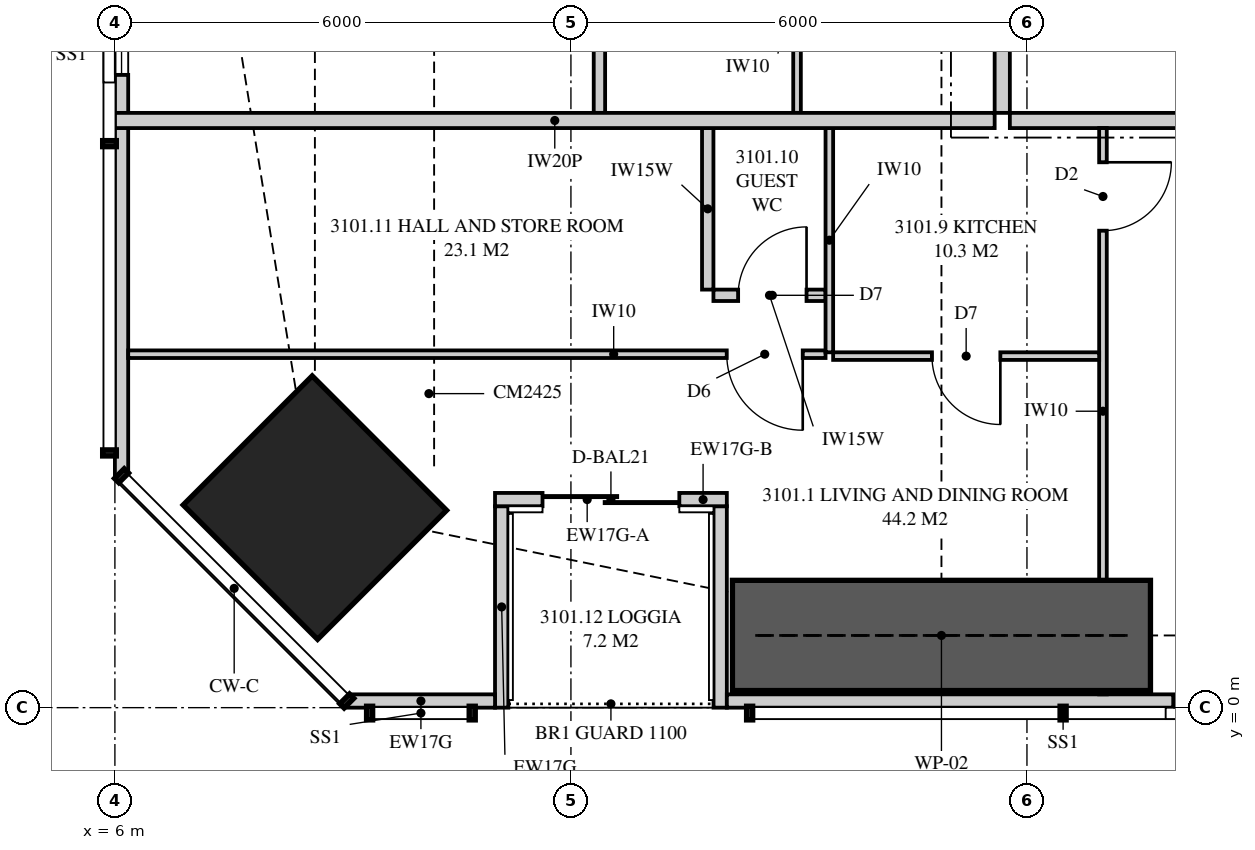
"""IFC4 building model, lengths in metres.
Left out: names, types, materials, properties, quantities, classifications, styles, units other than length and angle.
Written with IfcOpenShell. Run it as: python <this file> out.ifc"""

import sys

from ifc_helpers import new_model, si_unit, direction, frame, frame_2d, origin, origin_2d, place, context, subcontext, project, spatial, polyline, rectangle, outline, extrude, element, fill, save


model = new_model("IFC4")
c1 = context("Model", 3, precision=1e-05, world=origin(), true_north=direction((0.0, 1.0)))
c2 = subcontext(c1, "Body", "Model", "MODEL_VIEW")
j1 = project(units=[si_unit("LENGTHUNIT", "METRE"), si_unit("PLANEANGLEUNIT", "RADIAN")], contexts=[c1])
p1 = place(None, origin())
s1 = spatial("IfcSite", under=j1, at=p1, CompositionType="ELEMENT")
p2 = place(p1, origin())
s2 = spatial("IfcBuilding", under=s1, at=p2, CompositionType="ELEMENT")
p3 = place(p2, frame((0.0, 0.0, 114.9)))
s3 = spatial("IfcBuildingStorey", under=s2, at=p3, CompositionType="ELEMENT", Elevation=114.9)
p4 = place(p3, frame((8.631, 2.631, 0.0), z_axis=(0.0, 0.0, 1.0), x_axis=(0.707106781187, 0.707106781187, 0.0)))
e1 = element("IfcColumn", 1, at=p4, inside=s3, PredefinedType="COLUMN", context=c2, shape_type="SweptSolid", body=[
    extrude(rectangle(XDim=2.4, YDim=2.5, at=origin_2d()), origin(), (0.0, 0.0, 1.0), 3.35),
])
p5 = place(p3, frame((9.051, 0.087, 0.0), z_axis=(0.0, 0.0, 1.0), x_axis=(1.0, 0.0, 0.0)))
e2 = element("IfcWall", 2, at=p5, inside=s3, PredefinedType="SOLIDWALL", context=c2, shape_type="SweptSolid", body=[
    extrude(rectangle(XDim=1.95, YDim=0.175, at=frame_2d((0.975, 0.0))), origin(), (0.0, 0.0, 1.0), 3.11),
])
p6 = place(p3, frame((14.051, 0.087, 0.0), z_axis=(0.0, 0.0, 1.0), x_axis=(1.0, 0.0, 0.0)))
e3 = element("IfcWall", 3, at=p6, inside=s3, PredefinedType="SOLIDWALL", context=c2, shape_type="SweptSolid", body=[
    extrude(outline(polyline([(0.0, 0.0), (27.374, 0.0), (27.374, 3.11), (24.777, 3.11), (24.777, 2.15), (24.732, 2.15), (24.732, 3.11), (24.574, 3.11), (24.574, 2.15), (2.824, 2.15), (2.824, 3.11), (2.666, 3.11), (2.666, 2.15), (2.62, 2.15), (2.62, 3.11), (0.0, 3.11), (0.0, 0.0)])), frame((0.0, 0.087, 0.0), z_axis=(0.0, -1.0, 0.0), x_axis=(1.0, 0.0, 0.0)), (0.0, 0.0, 1.0), 0.175),
])
p7 = place(p6, frame((5.874, 0.0, 0.4)))
e4 = element("IfcOpeningElement", 4, at=p7, cuts=e3, PredefinedType="OPENING", context=c2, shape_type="SweptSolid", body=[
    extrude(rectangle(XDim=1.8, YDim=1.7, at=frame_2d((0.9, 0.85))), frame((0.0, 0.097, 0.0), z_axis=(0.0, -1.0, 0.0), x_axis=(1.0, 0.0, 0.0)), (0.0, 0.0, 1.0), 0.195),
])
p8 = place(p6, frame((9.04, 0.0, 0.4)))
e5 = element("IfcOpeningElement", 5, at=p8, cuts=e3, PredefinedType="OPENING", context=c2, shape_type="SweptSolid", body=[
    extrude(rectangle(XDim=1.8, YDim=1.7, at=frame_2d((0.9, 0.85))), frame((0.0, 0.097, 0.0), z_axis=(0.0, -1.0, 0.0), x_axis=(1.0, 0.0, 0.0)), (0.0, 0.0, 1.0), 0.195),
])
p9 = place(p6, frame((16.564, 0.0, 0.4)))
e6 = element("IfcOpeningElement", 6, at=p9, cuts=e3, PredefinedType="OPENING", context=c2, shape_type="SweptSolid", body=[
    extrude(rectangle(XDim=1.8, YDim=1.7, at=frame_2d((0.9, 0.85))), frame((0.0, 0.097, 0.0), z_axis=(0.0, -1.0, 0.0), x_axis=(1.0, 0.0, 0.0)), (0.0, 0.0, 1.0), 0.195),
])
p10 = place(p6, frame((19.889, 0.0, 0.4)))
e7 = element("IfcOpeningElement", 7, at=p10, cuts=e3, PredefinedType="OPENING", context=c2, shape_type="SweptSolid", body=[
    extrude(rectangle(XDim=1.8, YDim=1.7, at=frame_2d((0.9, 0.85))), frame((0.0, 0.097, 0.0), z_axis=(0.0, -1.0, 0.0), x_axis=(1.0, 0.0, 0.0)), (0.0, 0.0, 1.0), 0.195),
])
p11 = place(p3, frame((11.001, 2.738, 0.0), z_axis=(0.0, 0.0, 1.0), x_axis=(1.0, 0.0, 0.0)))
e8 = element("IfcWall", 8, at=p11, inside=s3, PredefinedType="SOLIDWALL", context=c2, shape_type="SweptSolid", body=[
    extrude(rectangle(XDim=2.425, YDim=0.175, at=frame_2d((1.212, 0.0))), origin(), (0.0, 0.0, 1.0), 2.15),
])
p12 = place(p11, frame((0.625, 0.0, 0.0)))
e9 = element("IfcOpeningElement", 9, at=p12, cuts=e8, PredefinedType="OPENING", context=c2, shape_type="SweptSolid", body=[
    extrude(rectangle(XDim=1.8, YDim=2.1, at=frame_2d((0.9, 1.05))), frame((0.0, 0.097, 0.0), z_axis=(0.0, -1.0, 0.0), x_axis=(1.0, 0.0, 0.0)), (0.0, 0.0, 1.0), 0.195),
])
p13 = place(p3, frame((13.426, 2.738, 0.0), z_axis=(0.0, 0.0, 1.0), x_axis=(1.0, 0.0, 0.0)))
e10 = element("IfcWall", 10, at=p13, inside=s3, PredefinedType="SOLIDWALL", context=c2, shape_type="SweptSolid", body=[
    extrude(rectangle(XDim=0.625, YDim=0.175, at=frame_2d((0.312, 0.0))), origin(), (0.0, 0.0, 1.0), 3.11),
])
p14 = place(p3, frame((11.089, 0.0, 0.0), z_axis=(0.0, 0.0, 1.0), x_axis=(0.0, 1.0, 0.0)))
e11 = element("IfcWall", 11, at=p14, inside=s3, PredefinedType="SOLIDWALL", context=c2, shape_type="SweptSolid", body=[
    extrude(outline(polyline([(0.0, 0.0), (2.65, 0.0), (2.65, 2.15), (1.296, 2.15), (1.296, 3.11), (0.0, 3.11), (0.0, 0.0)])), frame((0.0, 0.087, 0.0), z_axis=(0.0, -1.0, 0.0), x_axis=(1.0, 0.0, 0.0)), (0.0, 0.0, 1.0), 0.175),
])
p15 = place(p3, frame((13.964, 0.0, 0.0), z_axis=(0.0, 0.0, 1.0), x_axis=(0.0, 1.0, 0.0)))
e12 = element("IfcWall", 12, at=p15, inside=s3, PredefinedType="SOLIDWALL", context=c2, shape_type="SweptSolid", body=[
    extrude(outline(polyline([(0.0, 0.0), (2.65, 0.0), (2.65, 3.11), (2.378, 3.11), (2.378, 2.15), (0.709, 2.15), (0.709, 3.11), (0.0, 3.11), (0.0, 0.0)])), frame((0.0, 0.087, 0.0), z_axis=(0.0, -1.0, 0.0), x_axis=(1.0, 0.0, 0.0)), (0.0, 0.0, 1.0), 0.175),
])
p16 = place(p3, frame((6.087, 17.358, 0.0), z_axis=(0.0, 0.0, 1.0), x_axis=(0.0, -1.0, 0.0)))
e13 = element("IfcWall", 13, at=p16, inside=s3, PredefinedType="SOLIDWALL", context=c2, shape_type="SweptSolid", body=[
    extrude(outline(polyline([(0.0, 0.0), (14.307, 0.0), (14.307, 3.11), (4.577, 3.11), (4.577, 2.15), (4.484, 2.15), (4.484, 3.11), (4.358, 3.11), (4.358, 2.15), (0.0, 2.15), (0.0, 0.0)])), frame((0.0, 0.087, 0.0), z_axis=(0.0, -1.0, 0.0), x_axis=(1.0, 0.0, 0.0)), (0.0, 0.0, 1.0), 0.175),
])
p17 = place(p16, frame((0.3, 0.0, 0.4)))
e14 = element("IfcOpeningElement", 14, at=p17, cuts=e13, PredefinedType="OPENING", context=c2, shape_type="SweptSolid", body=[
    extrude(rectangle(XDim=1.2, YDim=1.7, at=frame_2d((0.6, 0.85))), frame((0.0, 0.097, 0.0), z_axis=(0.0, -1.0, 0.0), x_axis=(1.0, 0.0, 0.0)), (0.0, 0.0, 1.0), 0.195),
])
p18 = place(p16, frame((7.233, 0.0, 0.4)))
e15 = element("IfcOpeningElement", 15, at=p18, cuts=e13, PredefinedType="OPENING", context=c2, shape_type="SweptSolid", body=[
    extrude(rectangle(XDim=1.8, YDim=1.7, at=frame_2d((0.9, 0.85))), frame((0.0, 0.097, 0.0), z_axis=(0.0, -1.0, 0.0), x_axis=(1.0, 0.0, 0.0)), (0.0, 0.0, 1.0), 0.195),
])
p19 = place(p3, frame((17.775, 7.725, 0.0), z_axis=(0.0, 0.0, 1.0), x_axis=(1.0, 0.0, 0.0)))
e16 = element("IfcWall", 16, at=p19, inside=s3, PredefinedType="PARTITIONING", context=c2, shape_type="SweptSolid", body=[
    extrude(outline(polyline([(0.0, 0.0), (19.225, 0.0), (19.225, 3.11), (10.312, 3.11), (10.312, 2.541), (9.638, 2.541), (9.638, 3.11), (0.0, 3.11), (0.0, 0.0)])), frame((0.0, 0.1, 0.0), z_axis=(0.0, -1.0, 0.0), x_axis=(1.0, 0.0, 0.0)), (0.0, 0.0, 1.0), 0.2),
])
p20 = place(p19, frame((3.275, 0.0, 0.0)))
e17 = element("IfcOpeningElement", 17, at=p20, cuts=e16, PredefinedType="OPENING", context=c2, shape_type="SweptSolid", body=[
    extrude(rectangle(XDim=1.05, YDim=2.2, at=frame_2d((0.525, 1.1))), frame((0.0, 0.11, 0.0), z_axis=(0.0, -1.0, 0.0), x_axis=(1.0, 0.0, 0.0)), (0.0, 0.0, 1.0), 0.22),
])
p21 = place(p3, frame((19.0, 0.175, 0.0), z_axis=(0.0, 0.0, 1.0), x_axis=(0.0, 1.0, 0.0)))
e18 = element("IfcWall", 18, at=p21, inside=s3, PredefinedType="PARTITIONING", context=c2, shape_type="SweptSolid", body=[
    extrude(outline(polyline([(0.529, 2.15), (0.0, 2.15), (0.0, 0.0), (0.529, 0.0), (0.529, 0.017), (1.021, 0.017), (1.021, 0.0), (7.45, 0.0), (7.45, 3.11), (1.635, 3.11), (1.635, 2.15), (1.021, 2.15), (1.021, 2.133), (0.529, 2.133), (0.529, 2.15)])), frame((0.0, 0.05, 0.0), z_axis=(0.0, -1.0, 0.0), x_axis=(1.0, 0.0, 0.0)), (0.0, 0.0, 1.0), 0.1),
])
p22 = place(p21, frame((6.1, 0.0, 0.0)))
e19 = element("IfcOpeningElement", 19, at=p22, cuts=e18, PredefinedType="OPENING", context=c2, shape_type="SweptSolid", body=[
    extrude(rectangle(XDim=0.9, YDim=2.1, at=frame_2d((0.45, 1.05))), frame((0.0, 0.06, 0.0), z_axis=(0.0, -1.0, 0.0), x_axis=(1.0, 0.0, 0.0)), (0.0, 0.0, 1.0), 0.12),
])
p23 = place(p3, frame((15.45, 4.625, 0.0), z_axis=(0.0, 0.0, 1.0), x_axis=(1.0, 0.0, 0.0)))
e20 = element("IfcWall", 20, at=p23, inside=s3, PredefinedType="PARTITIONING", context=c2, shape_type="SweptSolid", body=[
    extrude(outline(polyline([(0.0, 0.0), (3.5, 0.0), (3.5, 3.11), (1.712, 3.11), (1.712, 2.541), (1.138, 2.541), (1.138, 3.11), (0.0, 3.11), (0.0, 0.0)])), frame((0.0, 0.05, 0.0), z_axis=(0.0, -1.0, 0.0), x_axis=(1.0, 0.0, 0.0)), (0.0, 0.0, 1.0), 0.1),
])
p24 = place(p23, frame((1.3, 0.0, 0.0)))
e21 = element("IfcOpeningElement", 21, at=p24, cuts=e20, PredefinedType="OPENING", context=c2, shape_type="SweptSolid", body=[
    extrude(rectangle(XDim=0.9, YDim=2.1, at=frame_2d((0.45, 1.05))), frame((0.0, 0.06, 0.0), z_axis=(0.0, -1.0, 0.0), x_axis=(1.0, 0.0, 0.0)), (0.0, 0.0, 1.0), 0.12),
])
p25 = place(p3, frame((15.4, 4.675, 0.0), z_axis=(0.0, 0.0, 1.0), x_axis=(0.0, 1.0, 0.0)))
e22 = element("IfcWall", 22, at=p25, inside=s3, PredefinedType="PARTITIONING", context=c2, shape_type="SweptSolid", body=[
    extrude(rectangle(XDim=2.95, YDim=0.1, at=frame_2d((1.475, 0.0))), origin(), (0.0, 0.0, 1.0), 3.11),
])
p26 = place(p3, frame((13.875, 5.425, 0.0), z_axis=(0.0, 0.0, 1.0), x_axis=(1.0, 0.0, 0.0)))
e23 = element("IfcWall", 23, at=p26, inside=s3, PredefinedType="PLUMBINGWALL", context=c2, shape_type="SweptSolid", body=[
    extrude(rectangle(XDim=1.475, YDim=0.15, at=frame_2d((0.738, 0.0))), origin(), (0.0, 0.0, 1.0), 3.11),
])
p27 = place(p26, frame((0.325, 0.0, 0.0)))
e24 = element("IfcOpeningElement", 24, at=p27, cuts=e23, PredefinedType="OPENING", context=c2, shape_type="SweptSolid", body=[
    extrude(rectangle(XDim=0.9, YDim=2.1, at=frame_2d((0.45, 1.05))), frame((0.0, 0.085, 0.0), z_axis=(0.0, -1.0, 0.0), x_axis=(1.0, 0.0, 0.0)), (0.0, 0.0, 1.0), 0.17),
])
p28 = place(p3, frame((13.8, 5.5, 0.0), z_axis=(0.0, 0.0, 1.0), x_axis=(0.0, 1.0, 0.0)))
e25 = element("IfcWall", 25, at=p28, inside=s3, PredefinedType="PLUMBINGWALL", context=c2, shape_type="SweptSolid", body=[
    extrude(rectangle(XDim=2.125, YDim=0.15, at=frame_2d((1.062, 0.0))), origin(), (0.0, 0.0, 1.0), 3.11),
])
p29 = place(p3, frame((6.175, 4.65, 0.0), z_axis=(0.0, 0.0, 1.0), x_axis=(1.0, 0.0, 0.0)))
e26 = element("IfcWall", 26, at=p29, inside=s3, PredefinedType="PARTITIONING", context=c2, shape_type="SweptSolid", body=[
    extrude(outline(polyline([(0.0, 0.0), (9.175, 0.0), (9.175, 3.11), (5.285, 3.11), (5.285, 2.51), (3.0, 2.51), (3.0, 2.15), (1.258, 2.15), (1.258, 3.11), (0.0, 3.11), (0.0, 0.0)])), frame((0.0, 0.05, 0.0), z_axis=(0.0, -1.0, 0.0), x_axis=(1.0, 0.0, 0.0)), (0.0, 0.0, 1.0), 0.1),
])
p30 = place(p29, frame((7.875, 0.0, 0.0)))
e27 = element("IfcOpeningElement", 27, at=p30, cuts=e26, PredefinedType="OPENING", context=c2, shape_type="SweptSolid", body=[
    extrude(rectangle(XDim=1.0, YDim=2.1, at=frame_2d((0.5, 1.05))), frame((0.0, 0.06, 0.0), z_axis=(0.0, -1.0, 0.0), x_axis=(1.0, 0.0, 0.0)), (0.0, 0.0, 1.0), 0.12),
])
p31 = place(p3, frame((6.0, 7.725, 0.0), z_axis=(0.0, 0.0, 1.0), x_axis=(1.0, 0.0, 0.0)))
e28 = element("IfcWall", 28, at=p31, inside=s3, PredefinedType="PARTITIONING", context=c2, shape_type="SweptSolid", body=[
    extrude(outline(polyline([(0.0, 0.0), (11.575, 0.0), (11.575, 3.11), (11.212, 3.11), (11.212, 2.541), (10.538, 2.541), (10.538, 3.11), (5.51, 3.11), (5.51, 2.51), (2.969, 2.51), (2.969, 2.541), (2.727, 2.541), (2.727, 2.15), (0.884, 2.15), (0.884, 3.11), (0.0, 3.11), (0.0, 0.0)])), frame((0.0, 0.1, 0.0), z_axis=(0.0, -1.0, 0.0), x_axis=(1.0, 0.0, 0.0)), (0.0, 0.0, 1.0), 0.2),
])
p32 = place(p3, frame((17.675, 7.825, 0.0), z_axis=(0.0, 0.0, 1.0), x_axis=(0.0, 1.0, 0.0)))
e29 = element("IfcWall", 29, at=p32, inside=s3, PredefinedType="PARTITIONING", context=c2, shape_type="SweptSolid", body=[
    extrude(outline(polyline([(0.0, 0.0), (9.075, 0.0), (9.075, 3.11), (3.087, 3.11), (3.087, 2.541), (2.413, 2.541), (2.413, 3.11), (0.0, 3.11), (0.0, 0.0)])), frame((0.0, 0.1, 0.0), z_axis=(0.0, -1.0, 0.0), x_axis=(1.0, 0.0, 0.0)), (0.0, 0.0, 1.0), 0.2),
])
p33 = place(p3, frame((12.375, 7.825, 0.0), z_axis=(0.0, 0.0, 1.0), x_axis=(0.0, 1.0, 0.0)))
e30 = element("IfcWall", 30, at=p33, inside=s3, PredefinedType="PLUMBINGWALL", context=c2, shape_type="SweptSolid", body=[
    extrude(outline(polyline([(0.0, 0.0), (3.45, 0.0), (3.45, 3.11), (3.062, 3.11), (3.062, 2.541), (2.438, 2.541), (2.438, 3.11), (0.0, 3.11), (0.0, 0.0)])), frame((0.0, 0.075, 0.0), z_axis=(0.0, -1.0, 0.0), x_axis=(1.0, 0.0, 0.0)), (0.0, 0.0, 1.0), 0.15),
])
p34 = place(p3, frame((14.975, 7.825, 0.0), z_axis=(0.0, 0.0, 1.0), x_axis=(0.0, 1.0, 0.0)))
e31 = element("IfcWall", 31, at=p34, inside=s3, PredefinedType="PARTITIONING", context=c2, shape_type="SweptSolid", body=[
    extrude(outline(polyline([(0.0, 0.0), (3.45, 0.0), (3.45, 3.11), (3.037, 3.11), (3.037, 2.541), (2.463, 2.541), (2.463, 3.11), (0.0, 3.11), (0.0, 0.0)])), frame((0.0, 0.05, 0.0), z_axis=(0.0, -1.0, 0.0), x_axis=(1.0, 0.0, 0.0)), (0.0, 0.0, 1.0), 0.1),
])
p35 = place(p3, frame((14.125, 0.95, 0.0), z_axis=(0.0, 0.0, 1.0), x_axis=(1.0, 0.0, 0.0)))
e32 = element("IfcWall", 32, at=p35, inside=s3, PredefinedType="SHEAR", context=c2, shape_type="SweptSolid", body=[
    extrude(rectangle(XDim=5.5, YDim=1.45, at=frame_2d((2.75, 0.0))), origin(), (0.0, 0.0, 1.0), 3.35),
])
p36 = place(p12, origin())
e33 = element("IfcDoor", 33, at=p36, inside=s3, OperationType="SLIDING_TO_LEFT", PredefinedType="DOOR", context=c2, shape_type="SweptSolid", body=[
    extrude(rectangle(XDim=1.8, YDim=2.1, at=frame_2d((0.9, 1.05))), frame((0.0, 0.025, 0.0), z_axis=(0.0, -1.0, 0.0), x_axis=(1.0, 0.0, 0.0)), (0.0, 0.0, 1.0), 0.05),
])
fill(e9, e33)
p37 = place(p7, origin())
e34 = element("IfcWindow", 34, at=p37, inside=s3, PartitioningType="SINGLE_PANEL", PredefinedType="WINDOW", context=c2, shape_type="SweptSolid", body=[
    extrude(rectangle(XDim=1.8, YDim=1.7, at=frame_2d((0.9, 0.85))), frame((0.0, 0.03, 0.0), z_axis=(0.0, -1.0, 0.0), x_axis=(1.0, 0.0, 0.0)), (0.0, 0.0, 1.0), 0.06),
])
fill(e4, e34)
p38 = place(p18, origin())
e35 = element("IfcWindow", 35, at=p38, inside=s3, PartitioningType="SINGLE_PANEL", PredefinedType="WINDOW", context=c2, shape_type="SweptSolid", body=[
    extrude(rectangle(XDim=1.8, YDim=1.7, at=frame_2d((0.9, 0.85))), frame((0.0, 0.03, 0.0), z_axis=(0.0, -1.0, 0.0), x_axis=(1.0, 0.0, 0.0)), (0.0, 0.0, 1.0), 0.06),
])
fill(e15, e35)
p39 = place(p22, frame((0.9, 0.0, 0.0), z_axis=(0.0, 0.0, 1.0), x_axis=(-1.0, 0.0, 0.0)))
e36 = element("IfcDoor", 36, at=p39, inside=s3, OperationType="SINGLE_SWING_LEFT", PredefinedType="DOOR", context=c2, shape_type="SweptSolid", body=[
    extrude(rectangle(XDim=0.9, YDim=2.1, at=frame_2d((0.45, 1.05))), frame((0.0, 0.025, 0.0), z_axis=(0.0, -1.0, 0.0), x_axis=(1.0, 0.0, 0.0)), (0.0, 0.0, 1.0), 0.05),
])
fill(e19, e36)
p40 = place(p24, frame((0.9, 0.0, 0.0), z_axis=(0.0, 0.0, 1.0), x_axis=(-1.0, 0.0, 0.0)))
e37 = element("IfcDoor", 37, at=p40, inside=s3, OperationType="SINGLE_SWING_LEFT", PredefinedType="DOOR", context=c2, shape_type="SweptSolid", body=[
    extrude(rectangle(XDim=0.9, YDim=2.1, at=frame_2d((0.45, 1.05))), frame((0.0, 0.025, 0.0), z_axis=(0.0, -1.0, 0.0), x_axis=(1.0, 0.0, 0.0)), (0.0, 0.0, 1.0), 0.05),
])
fill(e21, e37)
p41 = place(p27, origin())
e38 = element("IfcDoor", 38, at=p41, inside=s3, OperationType="SINGLE_SWING_RIGHT", PredefinedType="DOOR", context=c2, shape_type="SweptSolid", body=[
    extrude(rectangle(XDim=0.9, YDim=2.1, at=frame_2d((0.45, 1.05))), frame((0.0, 0.025, 0.0), z_axis=(0.0, -1.0, 0.0), x_axis=(1.0, 0.0, 0.0)), (0.0, 0.0, 1.0), 0.05),
])
fill(e24, e38)
p42 = place(p30, frame((1.0, 0.0, 0.0), z_axis=(0.0, 0.0, 1.0), x_axis=(-1.0, 0.0, 0.0)))
e39 = element("IfcDoor", 39, at=p42, inside=s3, OperationType="SINGLE_SWING_LEFT", PredefinedType="DOOR", context=c2, shape_type="SweptSolid", body=[
    extrude(rectangle(XDim=1.0, YDim=2.1, at=frame_2d((0.5, 1.05))), frame((0.0, 0.025, 0.0), z_axis=(0.0, -1.0, 0.0), x_axis=(1.0, 0.0, 0.0)), (0.0, 0.0, 1.0), 0.05),
])
fill(e27, e39)
save(model, sys.argv[1])
